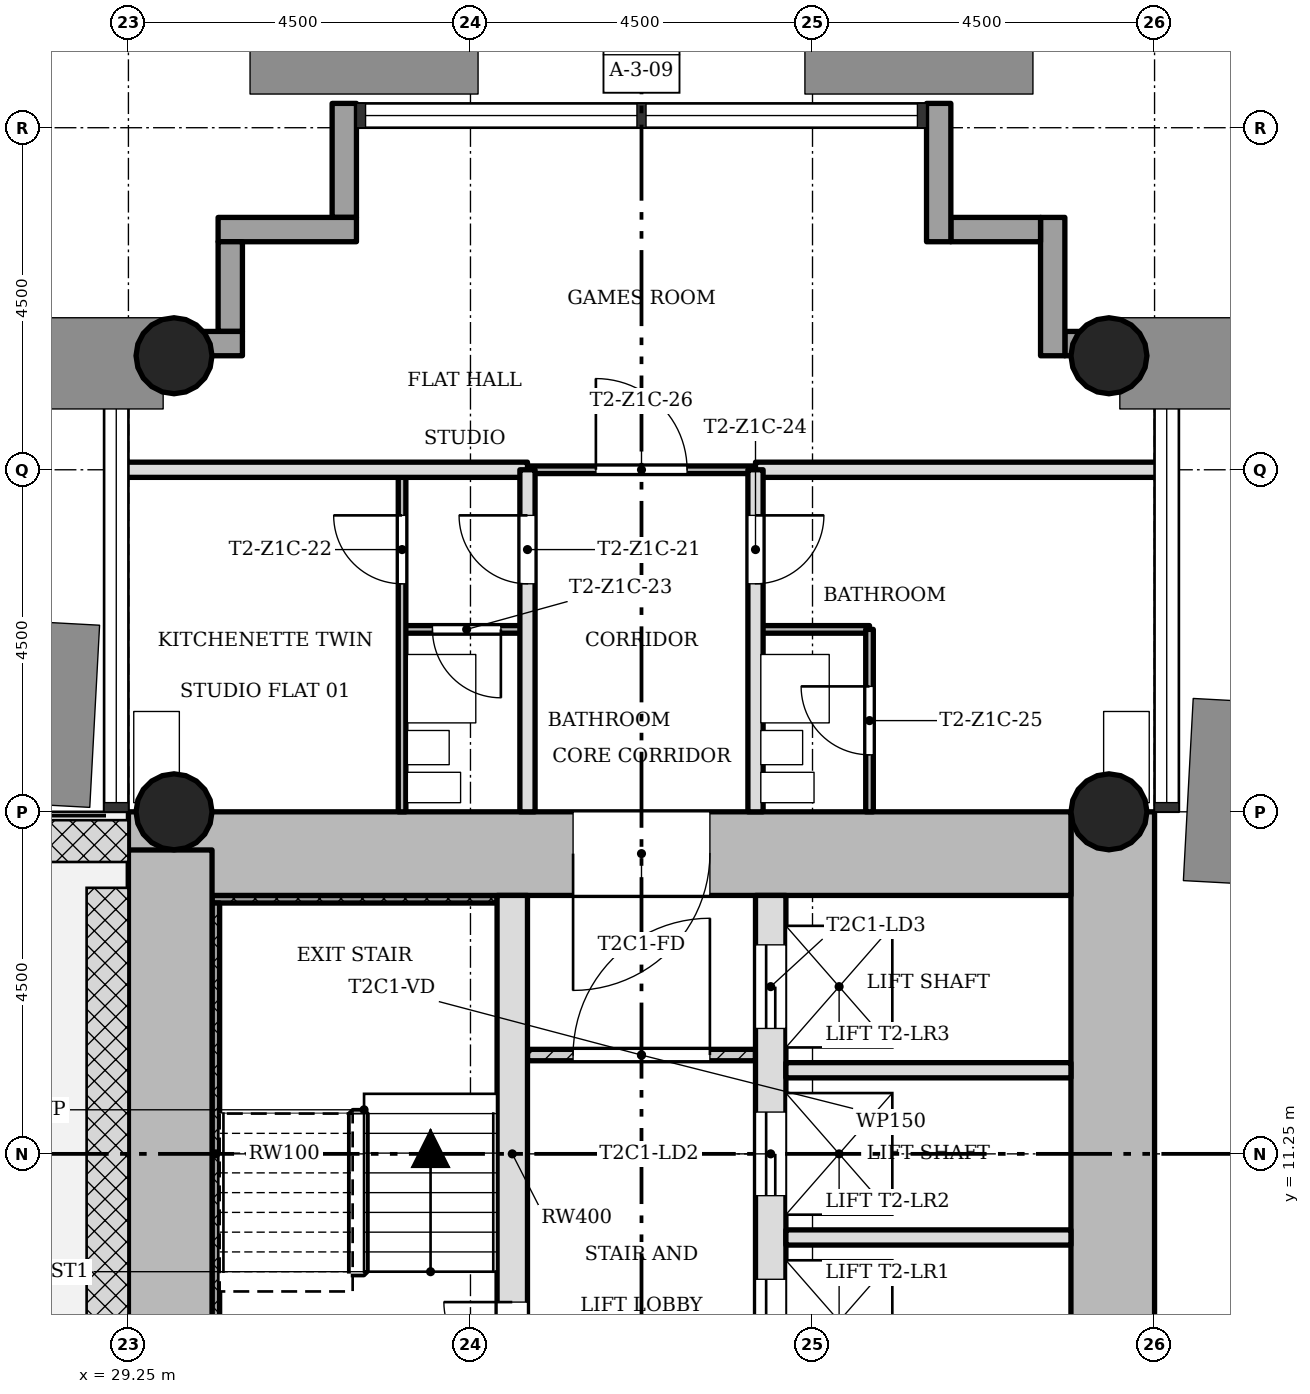
"""IFC4 building model, lengths in metres.
Left out: names, types, materials, properties, quantities, classifications, styles, units other than length and angle.
Written with IfcOpenShell. Run it as: python <this file> out.ifc"""

import sys

from ifc_helpers import new_model, si_unit, direction, frame, frame_2d, origin, origin_2d, place, context, subcontext, project, spatial, rectangle, hollow_circle, extrude, element, fill, save


model = new_model("IFC4")
c1 = context("Model", 3, precision=1e-05, world=origin(), true_north=direction((0.0, 1.0)))
c2 = subcontext(c1, "Body", "Model", "MODEL_VIEW")
j1 = project(units=[si_unit("LENGTHUNIT", "METRE"), si_unit("PLANEANGLEUNIT", "RADIAN")], contexts=[c1])
p1 = place(None, origin())
s1 = spatial("IfcSite", under=j1, at=p1, CompositionType="ELEMENT")
p2 = place(p1, origin())
s2 = spatial("IfcBuilding", under=s1, at=p2, CompositionType="ELEMENT")
p3 = place(p2, frame((0.0, 0.0, 44.9)))
s3 = spatial("IfcBuildingStorey", under=s2, at=p3, CompositionType="ELEMENT", Elevation=44.9)
p4 = place(p3, frame((42.2, 7.85, 0.0), z_axis=(0.0, 0.0, 1.0), x_axis=(0.0, 1.0, 0.0)))
e1 = element("IfcWall", 1, at=p4, inside=s3, PredefinedType="SHEAR", context=c2, shape_type="SweptSolid", body=[
    extrude(rectangle(XDim=7.9, YDim=1.1, at=frame_2d((3.95, 0.0))), origin(), (0.0, 0.0, 1.0), 3.4),
])
p5 = place(p3, frame((41.65, 15.2, 0.0), z_axis=(0.0, 0.0, 1.0), x_axis=(-1.0, 0.0, 0.0)))
e2 = element("IfcWall", 2, at=p5, inside=s3, PredefinedType="SHEAR", context=c2, shape_type="SweptSolid", body=[
    extrude(rectangle(XDim=12.4, YDim=1.1, at=frame_2d((6.2, 0.0))), origin(), (0.0, 0.0, 1.0), 3.4),
])
p6 = place(p5, frame((4.75, 0.0, 0.0)))
e3 = element("IfcOpeningElement", 3, at=p6, cuts=e2, PredefinedType="OPENING", context=c2, shape_type="SweptSolid", body=[
    extrude(rectangle(XDim=1.8, YDim=2.1, at=frame_2d((0.9, 1.05))), frame((0.0, 0.56, 0.0), z_axis=(0.0, -1.0, 0.0), x_axis=(1.0, 0.0, 0.0)), (0.0, 0.0, 1.0), 1.12),
])
p7 = place(p3, frame((29.8, 15.248, 0.0), z_axis=(0.0, 0.0, 1.0), x_axis=(0.0, -1.0, 0.0)))
e4 = element("IfcWall", 4, at=p7, inside=s3, PredefinedType="SHEAR", context=c2, shape_type="SweptSolid", body=[
    extrude(rectangle(XDim=8.596, YDim=1.1, at=frame_2d((4.298, 0.0))), origin(), (0.0, 0.0, 1.0), 3.4),
])
p8 = place(p3, frame((34.3, 7.85, 0.0), z_axis=(0.0, 0.0, 1.0), x_axis=(0.0, 1.0, 0.0)))
e5 = element("IfcWall", 5, at=p8, inside=s3, PredefinedType="SHEAR", context=c2, shape_type="SweptSolid", body=[
    extrude(rectangle(XDim=6.8, YDim=0.4, at=frame_2d((3.4, 0.0))), origin(), (0.0, 0.0, 1.0), 3.4),
])
p9 = place(p8, frame((0.55, 0.0, 0.0)))
e6 = element("IfcOpeningElement", 6, at=p9, cuts=e5, PredefinedType="OPENING", context=c2, shape_type="SweptSolid", body=[
    extrude(rectangle(XDim=0.9, YDim=2.1, at=frame_2d((0.45, 1.05))), frame((0.0, 0.21, 0.0), z_axis=(0.0, -1.0, 0.0), x_axis=(1.0, 0.0, 0.0)), (0.0, 0.0, 1.0), 0.42),
])
p10 = place(p3, frame((37.7, 7.85, 0.0), z_axis=(0.0, 0.0, 1.0), x_axis=(0.0, 1.0, 0.0)))
e7 = element("IfcWall", 7, at=p10, inside=s3, PredefinedType="SHEAR", context=c2, shape_type="SweptSolid", body=[
    extrude(rectangle(XDim=6.8, YDim=0.4, at=frame_2d((3.4, 0.0))), origin(), (0.0, 0.0, 1.0), 3.4),
])
p11 = place(p10, frame((0.65, 0.0, 0.0)))
e8 = element("IfcOpeningElement", 8, at=p11, cuts=e7, PredefinedType="OPENING", context=c2, shape_type="SweptSolid", body=[
    extrude(rectangle(XDim=1.1, YDim=2.1, at=frame_2d((0.55, 1.05))), frame((0.0, 0.21, 0.0), z_axis=(0.0, -1.0, 0.0), x_axis=(1.0, 0.0, 0.0)), (0.0, 0.0, 1.0), 0.42),
])
p12 = place(p10, frame((2.85, 0.0, 0.0)))
e9 = element("IfcOpeningElement", 9, at=p12, cuts=e7, PredefinedType="OPENING", context=c2, shape_type="SweptSolid", body=[
    extrude(rectangle(XDim=1.1, YDim=2.1, at=frame_2d((0.55, 1.05))), frame((0.0, 0.21, 0.0), z_axis=(0.0, -1.0, 0.0), x_axis=(1.0, 0.0, 0.0)), (0.0, 0.0, 1.0), 0.42),
])
p13 = place(p10, frame((5.05, 0.0, 0.0)))
e10 = element("IfcOpeningElement", 10, at=p13, cuts=e7, PredefinedType="OPENING", context=c2, shape_type="SweptSolid", body=[
    extrude(rectangle(XDim=1.1, YDim=2.1, at=frame_2d((0.55, 1.05))), frame((0.0, 0.21, 0.0), z_axis=(0.0, -1.0, 0.0), x_axis=(1.0, 0.0, 0.0)), (0.0, 0.0, 1.0), 0.42),
])
for number, where, z_axis, x_axis in (
    (11, (42.15, 15.75, 0.0), (0.0, 0.0, 1.0), (1.0, 0.0, 0.0)),
    (12, (29.85, 15.75, 0.0), (0.0, 0.0, 1.0), (1.0, 0.0, 0.0)),
    (13, (42.15, 21.75, 0.0), (0.0, 0.0, 1.0), (1.0, 0.0, 0.0)),
    (14, (29.85, 21.75, 0.0), (0.0, 0.0, 1.0), (1.0, 0.0, 0.0)),
):
    element("IfcColumn", number, at=place(p3, frame(where, z_axis=z_axis, x_axis=x_axis)), inside=s3, PredefinedType="COLUMN", context=c2, shape_type="SweptSolid", body=[
        extrude(hollow_circle(Radius=0.5, WallThickness=0.036, at=origin_2d()), origin(), (0.0, 0.0, 1.0), 3.4),
    ])
p14 = place(p3, frame((43.07, 21.91, -0.3), z_axis=(0.0, 0.0, 1.0), x_axis=(-1.0, 0.0, 0.0)))
e15 = element("IfcWall", 15, at=p14, inside=s3, PredefinedType="STANDARD", context=c2, shape_type="SweptSolid", body=[
    extrude(rectangle(XDim=1.5, YDim=0.32, at=frame_2d((0.75, 0.0))), origin(), (0.0, 0.0, 1.0), 3.4),
])
p15 = place(p3, frame((41.41, 21.75, -0.3), z_axis=(0.0, 0.0, 1.0), x_axis=(0.0, 1.0, 0.0)))
e16 = element("IfcWall", 16, at=p15, inside=s3, PredefinedType="STANDARD", context=c2, shape_type="SweptSolid", body=[
    extrude(rectangle(XDim=1.82, YDim=0.32, at=frame_2d((0.91, 0.0))), origin(), (0.0, 0.0, 1.0), 3.4),
])
p16 = place(p3, frame((41.25, 23.41, -0.3), z_axis=(0.0, 0.0, 1.0), x_axis=(-1.0, 0.0, 0.0)))
e17 = element("IfcWall", 17, at=p16, inside=s3, PredefinedType="STANDARD", context=c2, shape_type="SweptSolid", body=[
    extrude(rectangle(XDim=1.18, YDim=0.32, at=frame_2d((0.59, 0.0))), origin(), (0.0, 0.0, 1.0), 3.4),
])
p17 = place(p3, frame((39.91, 23.25, -0.3), z_axis=(0.0, 0.0, 1.0), x_axis=(0.0, 1.0, 0.0)))
e18 = element("IfcWall", 18, at=p17, inside=s3, PredefinedType="STANDARD", context=c2, shape_type="SweptSolid", body=[
    extrude(rectangle(XDim=1.82, YDim=0.32, at=frame_2d((0.91, 0.0))), origin(), (0.0, 0.0, 1.0), 3.4),
])
p18 = place(p3, frame((32.09, 25.07, -0.3), z_axis=(0.0, 0.0, 1.0), x_axis=(0.0, -1.0, 0.0)))
e19 = element("IfcWall", 19, at=p18, inside=s3, PredefinedType="STANDARD", context=c2, shape_type="SweptSolid", body=[
    extrude(rectangle(XDim=1.5, YDim=0.32, at=frame_2d((0.75, 0.0))), origin(), (0.0, 0.0, 1.0), 3.4),
])
p19 = place(p3, frame((32.25, 23.41, -0.3), z_axis=(0.0, 0.0, 1.0), x_axis=(-1.0, 0.0, 0.0)))
e20 = element("IfcWall", 20, at=p19, inside=s3, PredefinedType="STANDARD", context=c2, shape_type="SweptSolid", body=[
    extrude(rectangle(XDim=1.82, YDim=0.32, at=frame_2d((0.91, 0.0))), origin(), (0.0, 0.0, 1.0), 3.4),
])
p20 = place(p3, frame((30.59, 23.25, -0.3), z_axis=(0.0, 0.0, 1.0), x_axis=(0.0, -1.0, 0.0)))
e21 = element("IfcWall", 21, at=p20, inside=s3, PredefinedType="STANDARD", context=c2, shape_type="SweptSolid", body=[
    extrude(rectangle(XDim=1.18, YDim=0.32, at=frame_2d((0.59, 0.0))), origin(), (0.0, 0.0, 1.0), 3.4),
])
p21 = place(p3, frame((30.75, 21.91, -0.3), z_axis=(0.0, 0.0, 1.0), x_axis=(-1.0, 0.0, 0.0)))
e22 = element("IfcWall", 22, at=p21, inside=s3, PredefinedType="STANDARD", context=c2, shape_type="SweptSolid", body=[
    extrude(rectangle(XDim=1.82, YDim=0.32, at=frame_2d((0.91, 0.0))), origin(), (0.0, 0.0, 1.0), 3.4),
])
p22 = place(p3, frame((37.5, 12.55, 0.0), z_axis=(0.0, 0.0, 1.0), x_axis=(-1.0, 0.0, 0.0)))
e23 = element("IfcWall", 23, at=p22, inside=s3, PredefinedType="PARTITIONING", context=c2, shape_type="SweptSolid", body=[
    extrude(rectangle(XDim=3.0, YDim=0.15, at=frame_2d((1.5, 0.0))), origin(), (0.0, 0.0, 1.0), 3.0),
])
p23 = place(p22, frame((0.6, 0.0, 0.0)))
e24 = element("IfcOpeningElement", 24, at=p23, cuts=e23, PredefinedType="OPENING", context=c2, shape_type="SweptSolid", body=[
    extrude(rectangle(XDim=1.8, YDim=2.1, at=frame_2d((0.9, 1.05))), frame((0.0, 0.085, 0.0), z_axis=(0.0, -1.0, 0.0), x_axis=(1.0, 0.0, 0.0)), (0.0, 0.0, 1.0), 0.17),
])
for number, where, z_axis, x_axis in (
    (25, (41.65, 10.15, 0.0), (0.0, 0.0, 1.0), (-1.0, 0.0, 0.0)),
    (26, (41.65, 12.35, 0.0), (0.0, 0.0, 1.0), (-1.0, 0.0, 0.0)),
):
    element("IfcWall", number, at=place(p3, frame(where, z_axis=z_axis, x_axis=x_axis)), inside=s3, PredefinedType="SOLIDWALL", context=c2, shape_type="SweptSolid", body=[
        extrude(rectangle(XDim=3.75, YDim=0.2, at=frame_2d((1.875, 0.0))), origin(), (0.0, 0.0, 1.0), 3.0),
    ])
p24 = place(p3, frame((39.0, 18.15, 0.0), z_axis=(0.0, 0.0, 1.0), x_axis=(-1.0, 0.0, 0.0)))
e27 = element("IfcWall", 27, at=p24, inside=s3, PredefinedType="PARTITIONING", context=c2, shape_type="SweptSolid", body=[
    extrude(rectangle(XDim=1.5, YDim=0.1, at=frame_2d((0.75, 0.0))), origin(), (0.0, 0.0, 1.0), 3.0),
])
p25 = place(p3, frame((34.5, 18.15, 0.0), z_axis=(0.0, 0.0, 1.0), x_axis=(-1.0, 0.0, 0.0)))
e28 = element("IfcWall", 28, at=p25, inside=s3, PredefinedType="PARTITIONING", context=c2, shape_type="SweptSolid", body=[
    extrude(rectangle(XDim=1.65, YDim=0.1, at=frame_2d((0.825, 0.0))), origin(), (0.0, 0.0, 1.0), 3.0),
])
p26 = place(p25, frame((0.35, 0.0, 0.0)))
e29 = element("IfcOpeningElement", 29, at=p26, cuts=e28, PredefinedType="OPENING", context=c2, shape_type="SweptSolid", body=[
    extrude(rectangle(XDim=0.9, YDim=2.1, at=frame_2d((0.45, 1.05))), frame((0.0, 0.06, 0.0), z_axis=(0.0, -1.0, 0.0), x_axis=(1.0, 0.0, 0.0)), (0.0, 0.0, 1.0), 0.12),
])
p27 = place(p3, frame((37.5, 20.25, 0.0), z_axis=(0.0, 0.0, 1.0), x_axis=(-1.0, 0.0, 0.0)))
e30 = element("IfcWall", 30, at=p27, inside=s3, PredefinedType="PARTITIONING", context=c2, shape_type="SweptSolid", body=[
    extrude(rectangle(XDim=3.0, YDim=0.1, at=frame_2d((1.5, 0.0))), origin(), (0.0, 0.0, 1.0), 3.0),
])
p28 = place(p27, frame((0.9, 0.0, 0.0)))
e31 = element("IfcOpeningElement", 31, at=p28, cuts=e30, PredefinedType="OPENING", context=c2, shape_type="SweptSolid", body=[
    extrude(rectangle(XDim=1.2, YDim=2.1, at=frame_2d((0.6, 1.05))), frame((0.0, 0.06, 0.0), z_axis=(0.0, -1.0, 0.0), x_axis=(1.0, 0.0, 0.0)), (0.0, 0.0, 1.0), 0.12),
])
for number, where, z_axis, x_axis in (
    (32, (42.85, 20.25, 0.0), (0.0, 0.0, 1.0), (-1.0, 0.0, 0.0)),
    (33, (34.5, 20.25, 0.0), (0.0, 0.0, 1.0), (-1.0, 0.0, 0.0)),
):
    element("IfcWall", number, at=place(p3, frame(where, z_axis=z_axis, x_axis=x_axis)), inside=s3, PredefinedType="SOLIDWALL", context=c2, shape_type="SweptSolid", body=[
        extrude(rectangle(XDim=5.35, YDim=0.2, at=frame_2d((2.675, 0.0))), origin(), (0.0, 0.0, 1.0), 3.0),
    ])
p29 = place(p3, frame((39.0, 15.75, 0.0), z_axis=(0.0, 0.0, 1.0), x_axis=(0.0, 1.0, 0.0)))
e34 = element("IfcWall", 34, at=p29, inside=s3, PredefinedType="PARTITIONING", context=c2, shape_type="SweptSolid", body=[
    extrude(rectangle(XDim=2.4, YDim=0.1, at=frame_2d((1.2, 0.0))), origin(), (0.0, 0.0, 1.0), 3.0),
])
p30 = place(p29, frame((0.75, 0.0, 0.0)))
e35 = element("IfcOpeningElement", 35, at=p30, cuts=e34, PredefinedType="OPENING", context=c2, shape_type="SweptSolid", body=[
    extrude(rectangle(XDim=0.9, YDim=2.1, at=frame_2d((0.45, 1.05))), frame((0.0, 0.06, 0.0), z_axis=(0.0, -1.0, 0.0), x_axis=(1.0, 0.0, 0.0)), (0.0, 0.0, 1.0), 0.12),
])
p31 = place(p3, frame((37.5, 15.75, 0.0), z_axis=(0.0, 0.0, 1.0), x_axis=(0.0, 1.0, 0.0)))
e36 = element("IfcWall", 36, at=p31, inside=s3, PredefinedType="SOLIDWALL", context=c2, shape_type="SweptSolid", body=[
    extrude(rectangle(XDim=4.5, YDim=0.2, at=frame_2d((2.25, 0.0))), origin(), (0.0, 0.0, 1.0), 3.0),
])
p32 = place(p31, frame((3.0, 0.0, 0.0)))
e37 = element("IfcOpeningElement", 37, at=p32, cuts=e36, PredefinedType="OPENING", context=c2, shape_type="SweptSolid", body=[
    extrude(rectangle(XDim=0.9, YDim=2.1, at=frame_2d((0.45, 1.05))), frame((0.0, 0.11, 0.0), z_axis=(0.0, -1.0, 0.0), x_axis=(1.0, 0.0, 0.0)), (0.0, 0.0, 1.0), 0.22),
])
p33 = place(p3, frame((34.5, 15.75, 0.0), z_axis=(0.0, 0.0, 1.0), x_axis=(0.0, 1.0, 0.0)))
e38 = element("IfcWall", 38, at=p33, inside=s3, PredefinedType="SOLIDWALL", context=c2, shape_type="SweptSolid", body=[
    extrude(rectangle(XDim=4.5, YDim=0.2, at=frame_2d((2.25, 0.0))), origin(), (0.0, 0.0, 1.0), 3.0),
])
p34 = place(p33, frame((3.0, 0.0, 0.0)))
e39 = element("IfcOpeningElement", 39, at=p34, cuts=e38, PredefinedType="OPENING", context=c2, shape_type="SweptSolid", body=[
    extrude(rectangle(XDim=0.9, YDim=2.1, at=frame_2d((0.45, 1.05))), frame((0.0, 0.11, 0.0), z_axis=(0.0, -1.0, 0.0), x_axis=(1.0, 0.0, 0.0)), (0.0, 0.0, 1.0), 0.22),
])
p35 = place(p3, frame((32.85, 15.75, 0.0), z_axis=(0.0, 0.0, 1.0), x_axis=(0.0, 1.0, 0.0)))
e40 = element("IfcWall", 40, at=p35, inside=s3, PredefinedType="PARTITIONING", context=c2, shape_type="SweptSolid", body=[
    extrude(rectangle(XDim=4.5, YDim=0.1, at=frame_2d((2.25, 0.0))), origin(), (0.0, 0.0, 1.0), 3.0),
])
p36 = place(p35, frame((3.0, 0.0, 0.0)))
e41 = element("IfcOpeningElement", 41, at=p36, cuts=e40, PredefinedType="OPENING", context=c2, shape_type="SweptSolid", body=[
    extrude(rectangle(XDim=0.9, YDim=2.1, at=frame_2d((0.45, 1.05))), frame((0.0, 0.06, 0.0), z_axis=(0.0, -1.0, 0.0), x_axis=(1.0, 0.0, 0.0)), (0.0, 0.0, 1.0), 0.12),
])
p37 = place(p3, frame((34.1, 14.6, 0.0), z_axis=(0.0, 0.0, 1.0), x_axis=(-1.0, 0.0, 0.0)))
e42 = element("IfcWall", 42, at=p37, inside=s3, PredefinedType="SHEAR", context=c2, shape_type="SweptSolid", body=[
    extrude(rectangle(XDim=3.75, YDim=0.1, at=frame_2d((1.875, 0.0))), origin(), (0.0, 0.0, 1.0), 3.4),
])
p38 = place(p3, frame((30.4, 7.95, 0.0), z_axis=(0.0, 0.0, 1.0), x_axis=(0.0, 1.0, 0.0)))
e43 = element("IfcWall", 43, at=p38, inside=s3, PredefinedType="SHEAR", context=c2, shape_type="SweptSolid", body=[
    extrude(rectangle(XDim=6.6, YDim=0.1, at=frame_2d((3.3, 0.0))), origin(), (0.0, 0.0, 1.0), 3.4),
])
p39 = place(p23, origin())
e44 = element("IfcDoor", 44, at=p39, inside=s3, OperationType="SINGLE_SWING_LEFT", PredefinedType="DOOR", context=c2, shape_type="SweptSolid", body=[
    extrude(rectangle(XDim=1.8, YDim=2.1, at=frame_2d((0.9, 1.05))), frame((0.0, 0.025, 0.0), z_axis=(0.0, -1.0, 0.0), x_axis=(1.0, 0.0, 0.0)), (0.0, 0.0, 1.0), 0.05),
])
fill(e24, e44)
p40 = place(p34, origin())
e45 = element("IfcDoor", 45, at=p40, inside=s3, OperationType="SINGLE_SWING_LEFT", PredefinedType="DOOR", context=c2, shape_type="SweptSolid", body=[
    extrude(rectangle(XDim=0.9, YDim=2.1, at=frame_2d((0.45, 1.05))), frame((0.0, 0.025, 0.0), z_axis=(0.0, -1.0, 0.0), x_axis=(1.0, 0.0, 0.0)), (0.0, 0.0, 1.0), 0.05),
])
fill(e39, e45)
p41 = place(p36, origin())
e46 = element("IfcDoor", 46, at=p41, inside=s3, OperationType="SINGLE_SWING_LEFT", PredefinedType="DOOR", context=c2, shape_type="SweptSolid", body=[
    extrude(rectangle(XDim=0.9, YDim=2.1, at=frame_2d((0.45, 1.05))), frame((0.0, 0.025, 0.0), z_axis=(0.0, -1.0, 0.0), x_axis=(1.0, 0.0, 0.0)), (0.0, 0.0, 1.0), 0.05),
])
fill(e41, e46)
p42 = place(p26, origin())
e47 = element("IfcDoor", 47, at=p42, inside=s3, OperationType="SINGLE_SWING_RIGHT", PredefinedType="DOOR", context=c2, shape_type="SweptSolid", body=[
    extrude(rectangle(XDim=0.9, YDim=2.1, at=frame_2d((0.45, 1.05))), frame((0.0, 0.025, 0.0), z_axis=(0.0, -1.0, 0.0), x_axis=(1.0, 0.0, 0.0)), (0.0, 0.0, 1.0), 0.05),
])
fill(e29, e47)
p43 = place(p32, origin())
e48 = element("IfcDoor", 48, at=p43, inside=s3, OperationType="SINGLE_SWING_RIGHT", PredefinedType="DOOR", context=c2, shape_type="SweptSolid", body=[
    extrude(rectangle(XDim=0.9, YDim=2.1, at=frame_2d((0.45, 1.05))), frame((0.0, 0.025, 0.0), z_axis=(0.0, -1.0, 0.0), x_axis=(1.0, 0.0, 0.0)), (0.0, 0.0, 1.0), 0.05),
])
fill(e37, e48)
p44 = place(p30, origin())
e49 = element("IfcDoor", 49, at=p44, inside=s3, OperationType="SINGLE_SWING_LEFT", PredefinedType="DOOR", context=c2, shape_type="SweptSolid", body=[
    extrude(rectangle(XDim=0.9, YDim=2.1, at=frame_2d((0.45, 1.05))), frame((0.0, 0.025, 0.0), z_axis=(0.0, -1.0, 0.0), x_axis=(1.0, 0.0, 0.0)), (0.0, 0.0, 1.0), 0.05),
])
fill(e35, e49)
p45 = place(p28, origin())
e50 = element("IfcDoor", 50, at=p45, inside=s3, OperationType="SINGLE_SWING_RIGHT", PredefinedType="DOOR", context=c2, shape_type="SweptSolid", body=[
    extrude(rectangle(XDim=1.2, YDim=2.1, at=frame_2d((0.6, 1.05))), frame((0.0, 0.025, 0.0), z_axis=(0.0, -1.0, 0.0), x_axis=(1.0, 0.0, 0.0)), (0.0, 0.0, 1.0), 0.05),
])
fill(e31, e50)
p46 = place(p9, origin())
e51 = element("IfcDoor", 51, at=p46, inside=s3, OperationType="SINGLE_SWING_LEFT", PredefinedType="DOOR", context=c2, shape_type="SweptSolid", body=[
    extrude(rectangle(XDim=0.9, YDim=2.1, at=frame_2d((0.45, 1.05))), frame((0.0, 0.025, 0.0), z_axis=(0.0, -1.0, 0.0), x_axis=(1.0, 0.0, 0.0)), (0.0, 0.0, 1.0), 0.05),
])
fill(e6, e51)
p47 = place(p11, origin())
e52 = element("IfcDoor", 52, at=p47, inside=s3, OperationType="SLIDING_TO_LEFT", PredefinedType="DOOR", context=c2, shape_type="SweptSolid", body=[
    extrude(rectangle(XDim=1.1, YDim=2.1, at=frame_2d((0.55, 1.05))), frame((0.0, 0.025, 0.0), z_axis=(0.0, -1.0, 0.0), x_axis=(1.0, 0.0, 0.0)), (0.0, 0.0, 1.0), 0.05),
])
fill(e8, e52)
p48 = place(p12, origin())
e53 = element("IfcDoor", 53, at=p48, inside=s3, OperationType="SLIDING_TO_LEFT", PredefinedType="DOOR", context=c2, shape_type="SweptSolid", body=[
    extrude(rectangle(XDim=1.1, YDim=2.1, at=frame_2d((0.55, 1.05))), frame((0.0, 0.025, 0.0), z_axis=(0.0, -1.0, 0.0), x_axis=(1.0, 0.0, 0.0)), (0.0, 0.0, 1.0), 0.05),
])
fill(e9, e53)
p49 = place(p13, origin())
e54 = element("IfcDoor", 54, at=p49, inside=s3, OperationType="SLIDING_TO_LEFT", PredefinedType="DOOR", context=c2, shape_type="SweptSolid", body=[
    extrude(rectangle(XDim=1.1, YDim=2.1, at=frame_2d((0.55, 1.05))), frame((0.0, 0.025, 0.0), z_axis=(0.0, -1.0, 0.0), x_axis=(1.0, 0.0, 0.0)), (0.0, 0.0, 1.0), 0.05),
])
fill(e10, e54)
p50 = place(p6, origin())
e55 = element("IfcDoor", 55, at=p50, inside=s3, OperationType="SINGLE_SWING_LEFT", PredefinedType="DOOR", context=c2, shape_type="SweptSolid", body=[
    extrude(rectangle(XDim=1.8, YDim=2.1, at=frame_2d((0.9, 1.05))), frame((0.0, 0.025, 0.0), z_axis=(0.0, -1.0, 0.0), x_axis=(1.0, 0.0, 0.0)), (0.0, 0.0, 1.0), 0.05),
])
fill(e3, e55)
save(model, sys.argv[1])
